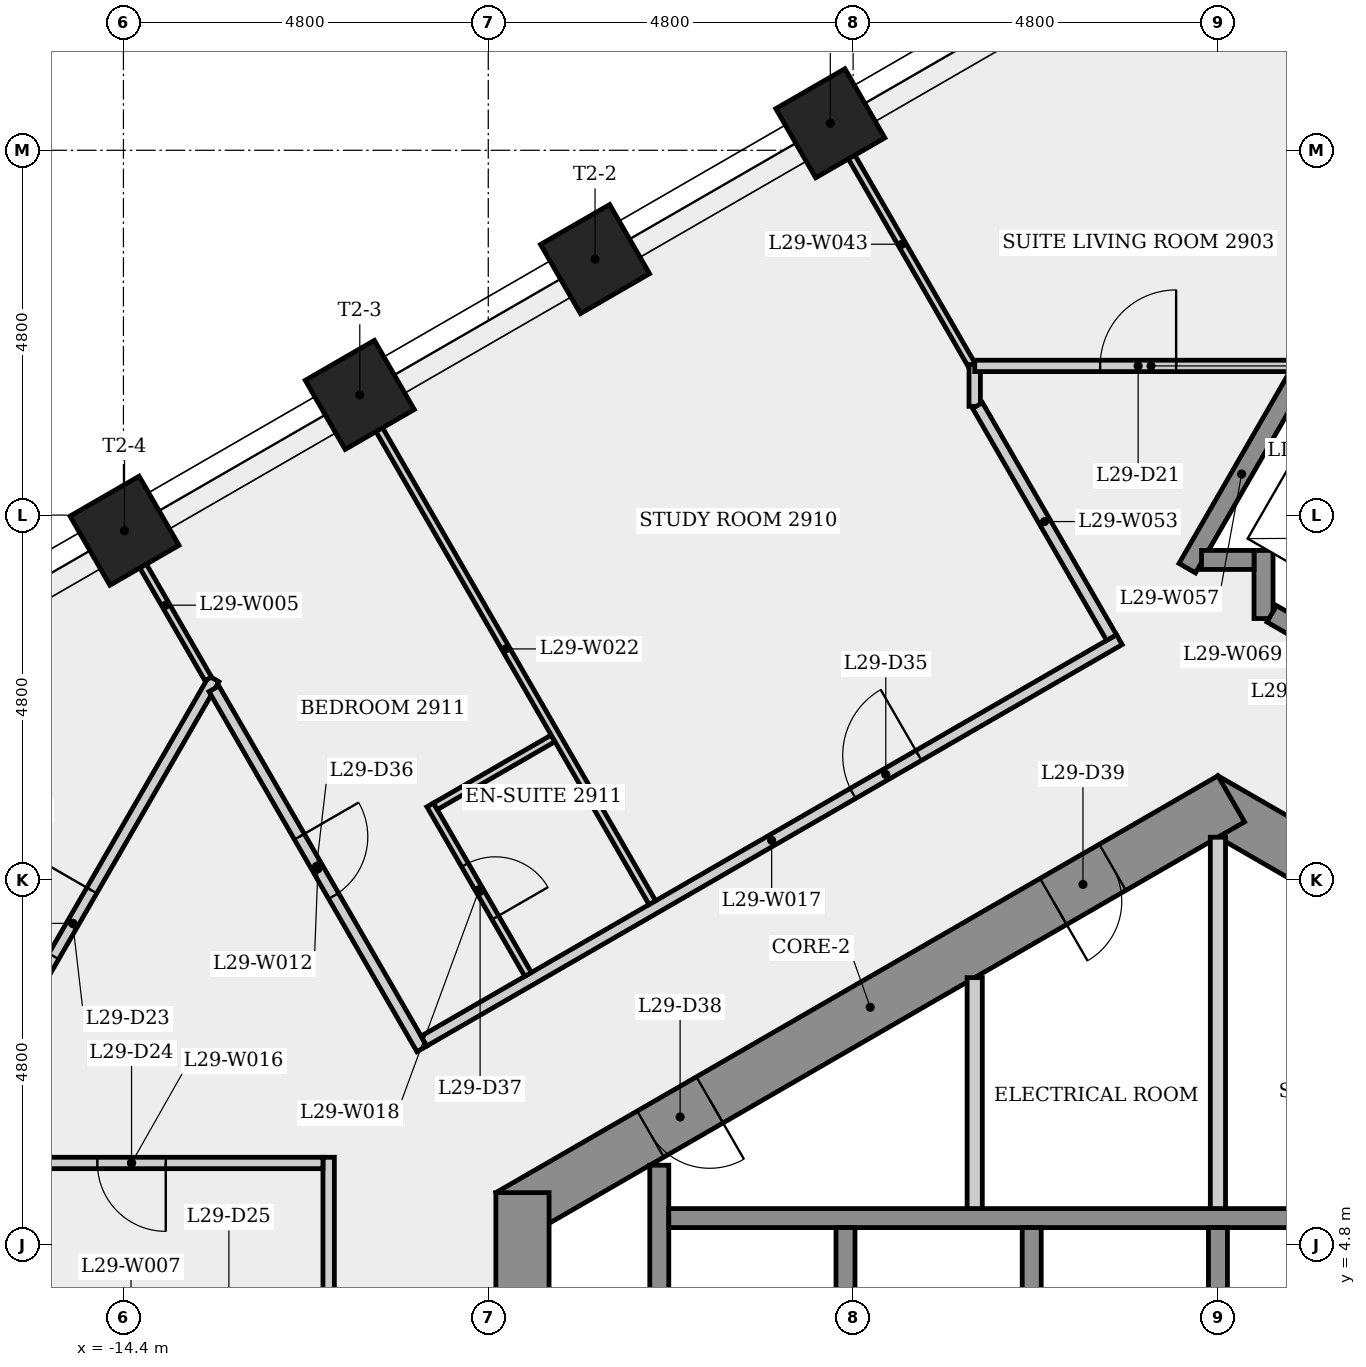
"""IFC4 building model, lengths in metres.
Left out: names, types, materials, properties, quantities, classifications, styles, units other than length and angle.
Written with IfcOpenShell. Run it as: python <this file> out.ifc"""

import sys

from ifc_helpers import new_model, si_unit, direction, frame, frame_2d, origin, origin_2d, place, context, subcontext, project, spatial, rectangle, extrude, element, fill, save


model = new_model("IFC4")
c1 = context("Model", 3, precision=1e-05, world=origin(), true_north=direction((0.0, 1.0)))
c2 = subcontext(c1, "Body", "Model", "MODEL_VIEW")
j1 = project(units=[si_unit("LENGTHUNIT", "METRE"), si_unit("PLANEANGLEUNIT", "RADIAN")], contexts=[c1])
p1 = place(None, origin())
s1 = spatial("IfcSite", under=j1, at=p1, CompositionType="ELEMENT")
p2 = place(p1, origin())
s2 = spatial("IfcBuilding", under=s1, at=p2, CompositionType="ELEMENT")
p3 = place(p2, frame((0.0, 0.0, 110.3)))
s3 = spatial("IfcBuildingStorey", under=s2, at=p3, CompositionType="ELEMENT", Elevation=110.3)
p4 = place(p3, frame((9.325, 5.182, 0.0), z_axis=(0.0, 0.0, 1.0), x_axis=(-0.866023993627, 0.500002442456, 0.0)))
e1 = element("IfcWall", 1, at=p4, inside=s3, PredefinedType="SHEAR", context=c2, shape_type="SweptSolid", body=[
    extrude(rectangle(XDim=10.97, YDim=0.7, at=frame_2d((5.485, 0.0))), origin(), (0.0, 0.0, 1.0), 3.4),
])
p5 = place(p4, frame((8.384, 0.0, 0.0)))
e2 = element("IfcOpeningElement", 2, at=p5, cuts=e1, PredefinedType="OPENING", context=c2, shape_type="SweptSolid", body=[
    extrude(rectangle(XDim=0.9, YDim=2.1, at=frame_2d((0.45, 1.05))), frame((0.0, 0.36, 0.0), z_axis=(0.0, -1.0, 0.0), x_axis=(1.0, 0.0, 0.0)), (0.0, 0.0, 1.0), 0.72),
])
p6 = place(p4, frame((1.663, 0.0, 0.0)))
e3 = element("IfcOpeningElement", 3, at=p6, cuts=e1, PredefinedType="OPENING", context=c2, shape_type="SweptSolid", body=[
    extrude(rectangle(XDim=0.9, YDim=2.1, at=frame_2d((0.45, 1.05))), frame((0.0, 0.36, 0.0), z_axis=(0.0, -1.0, 0.0), x_axis=(1.0, 0.0, 0.0)), (0.0, 0.0, 1.0), 0.72),
])
p7 = place(p3, frame((0.175, 10.667, 0.0), z_axis=(0.0, 0.0, 1.0), x_axis=(-0.866023993627, -0.500002442456, 0.0)))
e4 = element("IfcWall", 4, at=p7, inside=s3, PredefinedType="SHEAR", context=c2, shape_type="SweptSolid", body=[
    extrude(rectangle(XDim=10.97, YDim=0.7, at=frame_2d((5.485, 0.0))), origin(), (0.0, 0.0, 1.0), 3.4),
])
p8 = place(p7, frame((7.923, 0.0, 0.0)))
e5 = element("IfcOpeningElement", 5, at=p8, cuts=e4, PredefinedType="OPENING", context=c2, shape_type="SweptSolid", body=[
    extrude(rectangle(XDim=0.9, YDim=2.1, at=frame_2d((0.45, 1.05))), frame((0.0, 0.36, 0.0), z_axis=(0.0, -1.0, 0.0), x_axis=(1.0, 0.0, 0.0)), (0.0, 0.0, 1.0), 0.72),
])
p9 = place(p7, frame((1.802, 0.0, 0.0)))
e6 = element("IfcOpeningElement", 6, at=p9, cuts=e4, PredefinedType="OPENING", context=c2, shape_type="SweptSolid", body=[
    extrude(rectangle(XDim=0.9, YDim=2.1, at=frame_2d((0.45, 1.05))), frame((0.0, 0.36, 0.0), z_axis=(0.0, -1.0, 0.0), x_axis=(1.0, 0.0, 0.0)), (0.0, 0.0, 1.0), 0.72),
])
p10 = place(p3, frame((-9.15, 5.485, 0.0), z_axis=(0.0, 0.0, 1.0), x_axis=(0.0, -1.0, 0.0)))
e7 = element("IfcWall", 7, at=p10, inside=s3, PredefinedType="SHEAR", context=c2, shape_type="SweptSolid", body=[
    extrude(rectangle(XDim=10.97, YDim=0.7, at=frame_2d((5.485, 0.0))), origin(), (0.0, 0.0, 1.0), 3.4),
])
p11 = place(p10, frame((4.685, 0.0, 0.0)))
e8 = element("IfcOpeningElement", 8, at=p11, cuts=e7, PredefinedType="OPENING", context=c2, shape_type="SweptSolid", body=[
    extrude(rectangle(XDim=1.6, YDim=2.1, at=frame_2d((0.8, 1.05))), frame((0.0, 0.36, 0.0), z_axis=(0.0, -1.0, 0.0), x_axis=(1.0, 0.0, 0.0)), (0.0, 0.0, 1.0), 0.72),
])
for number, where, z_axis, x_axis in (
    (9, (-5.1, 19.556, 0.0), (0.0, 0.0, 1.0), (-0.5, 0.866, 0.0)),
    (10, (-8.195, 17.769, 0.0), (0.0, 0.0, 1.0), (-0.5, 0.866, 0.0)),
    (11, (-11.291, 15.981, 0.0), (0.0, 0.0, 1.0), (-0.5, 0.866, 0.0)),
    (12, (-14.386, 14.194, 0.0), (0.0, 0.0, 1.0), (-0.5, 0.866, 0.0)),
):
    element("IfcColumn", number, at=place(p3, frame(where, z_axis=z_axis, x_axis=x_axis)), inside=s3, PredefinedType="COLUMN", context=c2, shape_type="SweptSolid", body=[
        extrude(rectangle(XDim=1.05, YDim=1.05, at=origin_2d()), origin(), (0.0, 0.0, 1.0), 3.4),
    ])
p12 = place(p3, frame((-16.924, 5.81, 0.0), z_axis=(0.0, 0.0, 1.0), x_axis=(0.500008780733, 0.866020334166, 0.0)))
e13 = element("IfcWall", 13, at=p12, inside=s3, PredefinedType="PARTITIONING", context=c2, shape_type="SweptSolid", body=[
    extrude(rectangle(XDim=7.43, YDim=0.15, at=frame_2d((3.715, 0.0))), origin(), (0.0, 0.0, 1.0), 3.05),
])
p13 = place(p12, frame((3.215, 0.0, 0.0)))
e14 = element("IfcOpeningElement", 14, at=p13, cuts=e13, PredefinedType="OPENING", context=c2, shape_type="SweptSolid", body=[
    extrude(rectangle(XDim=1.0, YDim=2.1, at=frame_2d((0.5, 1.05))), frame((0.0, 0.085, 0.0), z_axis=(0.0, -1.0, 0.0), x_axis=(1.0, 0.0, 0.0)), (0.0, 0.0, 1.0), 0.17),
])
p14 = place(p3, frame((-14.404, 14.184, 0.0), z_axis=(0.0, 0.0, 1.0), x_axis=(0.500008734195, -0.866020361036, 0.0)))
e15 = element("IfcWall", 15, at=p14, inside=s3, PredefinedType="PARTITIONING", context=c2, shape_type="SweptSolid", body=[
    extrude(rectangle(XDim=2.239, YDim=0.1, at=frame_2d((1.12, 0.0))), origin(), (0.0, 0.0, 1.0), 3.05),
])
p15 = place(p3, frame((-13.209, 12.115, 0.0), z_axis=(0.0, 0.0, 1.0), x_axis=(0.499992837287, -0.866029539139, 0.0)))
e16 = element("IfcWall", 16, at=p15, inside=s3, PredefinedType="PARTITIONING", context=c2, shape_type="SweptSolid", body=[
    extrude(rectangle(XDim=5.471, YDim=0.15, at=frame_2d((2.736, 0.0))), origin(), (0.0, 0.0, 1.0), 3.05),
])
p16 = place(p15, frame((2.248, 0.0, 0.0)))
e17 = element("IfcOpeningElement", 17, at=p16, cuts=e16, PredefinedType="OPENING", context=c2, shape_type="SweptSolid", body=[
    extrude(rectangle(XDim=0.9, YDim=2.1, at=frame_2d((0.45, 1.05))), frame((0.0, 0.085, 0.0), z_axis=(0.0, -1.0, 0.0), x_axis=(1.0, 0.0, 0.0)), (0.0, 0.0, 1.0), 0.17),
])
p17 = place(p3, frame((-11.7, 5.95, 0.0), z_axis=(0.0, 0.0, 1.0), x_axis=(0.0, -1.0, 0.0)))
e18 = element("IfcWall", 18, at=p17, inside=s3, PredefinedType="PARTITIONING", context=c2, shape_type="SweptSolid", body=[
    extrude(rectangle(XDim=11.825, YDim=0.15, at=frame_2d((5.913, 0.0))), origin(), (0.0, 0.0, 1.0), 3.05),
])
p18 = place(p17, frame((7.424, 0.0, 0.0)))
e19 = element("IfcOpeningElement", 19, at=p18, cuts=e18, PredefinedType="OPENING", context=c2, shape_type="SweptSolid", body=[
    extrude(rectangle(XDim=1.0, YDim=2.1, at=frame_2d((0.5, 1.05))), frame((0.0, 0.085, 0.0), z_axis=(0.0, -1.0, 0.0), x_axis=(1.0, 0.0, 0.0)), (0.0, 0.0, 1.0), 0.17),
])
p19 = place(p3, frame((-11.775, 5.875, 0.0), z_axis=(0.0, 0.0, 1.0), x_axis=(-1.0, 0.0, 0.0)))
e20 = element("IfcWall", 20, at=p19, inside=s3, PredefinedType="PARTITIONING", context=c2, shape_type="SweptSolid", body=[
    extrude(rectangle(XDim=5.037, YDim=0.15, at=frame_2d((2.518, 0.0))), origin(), (0.0, 0.0, 1.0), 3.05),
])
p20 = place(p19, frame((2.068, 0.0, 0.0)))
e21 = element("IfcOpeningElement", 21, at=p20, cuts=e20, PredefinedType="OPENING", context=c2, shape_type="SweptSolid", body=[
    extrude(rectangle(XDim=0.9, YDim=2.1, at=frame_2d((0.45, 1.05))), frame((0.0, 0.085, 0.0), z_axis=(0.0, -1.0, 0.0), x_axis=(1.0, 0.0, 0.0)), (0.0, 0.0, 1.0), 0.17),
])
p21 = place(p3, frame((-10.446, 7.479, 0.0), z_axis=(0.0, 0.0, 1.0), x_axis=(0.866020092673, 0.500009199002, 0.0)))
e22 = element("IfcWall", 22, at=p21, inside=s3, PredefinedType="PARTITIONING", context=c2, shape_type="SweptSolid", body=[
    extrude(rectangle(XDim=10.564, YDim=0.15, at=frame_2d((5.282, 0.0))), origin(), (0.0, 0.0, 1.0), 3.05),
])
p22 = place(p21, frame((6.516, 0.0, 0.0)))
e23 = element("IfcOpeningElement", 23, at=p22, cuts=e22, PredefinedType="OPENING", context=c2, shape_type="SweptSolid", body=[
    extrude(rectangle(XDim=1.0, YDim=2.1, at=frame_2d((0.5, 1.05))), frame((0.0, 0.085, 0.0), z_axis=(0.0, -1.0, 0.0), x_axis=(1.0, 0.0, 0.0)), (0.0, 0.0, 1.0), 0.17),
])
p23 = place(p3, frame((-10.364, 10.586, 0.0), z_axis=(0.0, 0.0, 1.0), x_axis=(0.499963209246, -0.866046643894, 0.0)))
e24 = element("IfcWall", 24, at=p23, inside=s3, PredefinedType="PARTITIONING", context=c2, shape_type="SweptSolid", body=[
    extrude(rectangle(XDim=2.575, YDim=0.1, at=frame_2d((1.288, 0.0))), origin(), (0.0, 0.0, 1.0), 3.05),
])
p24 = place(p23, frame((0.913, 0.0, 0.0)))
e25 = element("IfcOpeningElement", 25, at=p24, cuts=e24, PredefinedType="OPENING", context=c2, shape_type="SweptSolid", body=[
    extrude(rectangle(XDim=0.8, YDim=2.1, at=frame_2d((0.4, 1.05))), frame((0.0, 0.06, 0.0), z_axis=(0.0, -1.0, 0.0), x_axis=(1.0, 0.0, 0.0)), (0.0, 0.0, 1.0), 0.12),
])
p25 = place(p3, frame((-8.747, 11.462, 0.0), z_axis=(0.0, 0.0, 1.0), x_axis=(-0.866033252409, -0.499986405537, 0.0)))
e26 = element("IfcWall", 26, at=p25, inside=s3, PredefinedType="PARTITIONING", context=c2, shape_type="SweptSolid", body=[
    extrude(rectangle(XDim=1.788, YDim=0.1, at=frame_2d((0.894, 0.0))), origin(), (0.0, 0.0, 1.0), 3.05),
])
p26 = place(p3, frame((-11.296, 15.978, 0.0), z_axis=(0.0, 0.0, 1.0), x_axis=(0.499997453958, -0.866026873738, 0.0)))
e27 = element("IfcWall", 27, at=p26, inside=s3, PredefinedType="PARTITIONING", context=c2, shape_type="SweptSolid", body=[
    extrude(rectangle(XDim=7.71, YDim=0.1, at=frame_2d((3.855, 0.0))), origin(), (0.0, 0.0, 1.0), 3.05),
])
p27 = place(p3, frame((-7.35, 1.925, 0.0), z_axis=(0.0, 0.0, 1.0), x_axis=(0.0, 1.0, 0.0)))
e28 = element("IfcWall", 28, at=p27, inside=s3, PredefinedType="SHEAR", context=c2, shape_type="SweptSolid", body=[
    extrude(rectangle(XDim=3.921, YDim=0.25, at=frame_2d((1.96, 0.0))), origin(), (0.0, 0.0, 1.0), 3.05),
])
p28 = place(p3, frame((-7.225, 5.15, 0.0), z_axis=(0.0, 0.0, 1.0), x_axis=(1.0, 0.0, 0.0)))
e29 = element("IfcWall", 29, at=p28, inside=s3, PredefinedType="SHEAR", context=c2, shape_type="SweptSolid", body=[
    extrude(rectangle(XDim=14.7, YDim=0.25, at=frame_2d((7.35, 0.0))), origin(), (0.0, 0.0, 1.0), 3.05),
])
p29 = place(p3, frame((-4.9, 5.025, 0.0), z_axis=(0.0, 0.0, 1.0), x_axis=(0.0, -1.0, 0.0)))
e30 = element("IfcWall", 30, at=p29, inside=s3, PredefinedType="SHEAR", context=c2, shape_type="SweptSolid", body=[
    extrude(rectangle(XDim=3.1, YDim=0.25, at=frame_2d((1.55, 0.0))), origin(), (0.0, 0.0, 1.0), 3.4),
])
p30 = place(p3, frame((-3.232, 16.362, 0.0), z_axis=(0.0, 0.0, 1.0), x_axis=(-0.499992827086, 0.866029545028, 0.0)))
e31 = element("IfcWall", 31, at=p30, inside=s3, PredefinedType="PARTITIONING", context=c2, shape_type="SweptSolid", body=[
    extrude(rectangle(XDim=3.7, YDim=0.1, at=frame_2d((1.85, 0.0))), origin(), (0.0, 0.0, 1.0), 3.05),
])
p31 = place(p3, frame((-3.2, 8.314, 0.0), z_axis=(0.0, 0.0, 1.0), x_axis=(0.0, -1.0, 0.0)))
e32 = element("IfcWall", 32, at=p31, inside=s3, PredefinedType="PARTITIONING", context=c2, shape_type="SweptSolid", body=[
    extrude(rectangle(XDim=3.039, YDim=0.2, at=frame_2d((1.52, 0.0))), origin(), (0.0, 0.0, 1.0), 3.05),
])
p32 = place(p3, frame((-3.2, 15.831, 0.0), z_axis=(0.0, 0.0, 1.0), x_axis=(0.0, 1.0, 0.0)))
e33 = element("IfcWall", 33, at=p32, inside=s3, PredefinedType="PARTITIONING", context=c2, shape_type="SweptSolid", body=[
    extrude(rectangle(XDim=0.55, YDim=0.15, at=frame_2d((0.275, 0.0))), origin(), (0.0, 0.0, 1.0), 3.05),
])
p33 = place(p3, frame((-3.2, 16.363, 0.0), z_axis=(0.0, 0.0, 1.0), x_axis=(1.0, 0.0, 0.0)))
e34 = element("IfcWall", 34, at=p33, inside=s3, PredefinedType="PARTITIONING", context=c2, shape_type="SweptSolid", body=[
    extrude(rectangle(XDim=4.639, YDim=0.15, at=frame_2d((2.32, 0.0))), origin(), (0.0, 0.0, 1.0), 3.05),
])
p34 = place(p33, frame((1.65, 0.0, 0.0)))
e35 = element("IfcOpeningElement", 35, at=p34, cuts=e34, PredefinedType="OPENING", context=c2, shape_type="SweptSolid", body=[
    extrude(rectangle(XDim=1.0, YDim=2.1, at=frame_2d((0.5, 1.05))), frame((0.0, 0.085, 0.0), z_axis=(0.0, -1.0, 0.0), x_axis=(1.0, 0.0, 0.0)), (0.0, 0.0, 1.0), 0.17),
])
p35 = place(p3, frame((-2.45, 5.025, 0.0), z_axis=(0.0, 0.0, 1.0), x_axis=(0.0, -1.0, 0.0)))
e36 = element("IfcWall", 36, at=p35, inside=s3, PredefinedType="SHEAR", context=c2, shape_type="SweptSolid", body=[
    extrude(rectangle(XDim=3.1, YDim=0.25, at=frame_2d((1.55, 0.0))), origin(), (0.0, 0.0, 1.0), 3.4),
])
p36 = place(p3, frame((-1.4, 12.788, 0.0), z_axis=(0.0, 0.0, 1.0), x_axis=(-0.500012199891, 0.86601836006, 0.0)))
e37 = element("IfcWall", 37, at=p36, inside=s3, PredefinedType="PARTITIONING", context=c2, shape_type="SweptSolid", body=[
    extrude(rectangle(XDim=3.525, YDim=0.15, at=frame_2d((1.763, 0.0))), origin(), (0.0, 0.0, 1.0), 3.05),
])
p37 = place(p3, frame((-0.403, 13.702, 0.0), z_axis=(0.0, 0.0, 1.0), x_axis=(0.499976111731, 0.866039195244, 0.0)))
e38 = element("IfcWall", 38, at=p37, inside=s3, PredefinedType="SHEAR", context=c2, shape_type="SweptSolid", body=[
    extrude(rectangle(XDim=2.861, YDim=0.25, at=frame_2d((1.43, 0.0))), origin(), (0.0, 0.0, 1.0), 3.05),
])
p38 = place(p3, frame((0.0, 5.025, 0.0), z_axis=(0.0, 0.0, 1.0), x_axis=(0.0, -1.0, 0.0)))
e39 = element("IfcWall", 39, at=p38, inside=s3, PredefinedType="SHEAR", context=c2, shape_type="SweptSolid", body=[
    extrude(rectangle(XDim=3.1, YDim=0.25, at=frame_2d((1.55, 0.0))), origin(), (0.0, 0.0, 1.0), 3.4),
])
p39 = place(p3, frame((0.0, 10.161, 0.0), z_axis=(0.0, 0.0, 1.0), x_axis=(0.0, -1.0, 0.0)))
e40 = element("IfcWall", 40, at=p39, inside=s3, PredefinedType="PARTITIONING", context=c2, shape_type="SweptSolid", body=[
    extrude(rectangle(XDim=4.886, YDim=0.2, at=frame_2d((2.443, 0.0))), origin(), (0.0, 0.0, 1.0), 3.05),
])
p40 = place(p3, frame((0.6, 13.039, 0.0), z_axis=(0.0, 0.0, 1.0), x_axis=(0.0, 1.0, 0.0)))
e41 = element("IfcWall", 41, at=p40, inside=s3, PredefinedType="SHEAR", context=c2, shape_type="SweptSolid", body=[
    extrude(rectangle(XDim=0.896, YDim=0.25, at=frame_2d((0.448, 0.0))), origin(), (0.0, 0.0, 1.0), 3.05),
])
p41 = place(p3, frame((0.475, 13.81, 0.0), z_axis=(0.0, 0.0, 1.0), x_axis=(-1.0, 0.0, 0.0)))
e42 = element("IfcWall", 42, at=p41, inside=s3, PredefinedType="SHEAR", context=c2, shape_type="SweptSolid", body=[
    extrude(rectangle(XDim=0.691, YDim=0.25, at=frame_2d((0.345, 0.0))), origin(), (0.0, 0.0, 1.0), 3.4),
])
p42 = place(p3, frame((2.581, 12.02, 0.0), z_axis=(0.0, 0.0, 1.0), x_axis=(-0.86603892542, 0.499976579108, 0.0)))
e43 = element("IfcWall", 43, at=p42, inside=s3, PredefinedType="SHEAR", context=c2, shape_type="SweptSolid", body=[
    extrude(rectangle(XDim=2.162, YDim=0.25, at=frame_2d((1.081, 0.0))), origin(), (0.0, 0.0, 1.0), 3.05),
])
p43 = place(p34, origin())
e44 = element("IfcDoor", 44, at=p43, inside=s3, OperationType="SINGLE_SWING_RIGHT", PredefinedType="DOOR", context=c2, shape_type="SweptSolid", body=[
    extrude(rectangle(XDim=1.0, YDim=2.1, at=frame_2d((0.5, 1.05))), frame((0.0, 0.025, 0.0), z_axis=(0.0, -1.0, 0.0), x_axis=(1.0, 0.0, 0.0)), (0.0, 0.0, 1.0), 0.05),
])
fill(e35, e44)
p44 = place(p13, origin())
e45 = element("IfcDoor", 45, at=p44, inside=s3, OperationType="SINGLE_SWING_RIGHT", PredefinedType="DOOR", context=c2, shape_type="SweptSolid", body=[
    extrude(rectangle(XDim=1.0, YDim=2.1, at=frame_2d((0.5, 1.05))), frame((0.0, 0.025, 0.0), z_axis=(0.0, -1.0, 0.0), x_axis=(1.0, 0.0, 0.0)), (0.0, 0.0, 1.0), 0.05),
])
fill(e14, e45)
p45 = place(p20, origin())
e46 = element("IfcDoor", 46, at=p45, inside=s3, OperationType="SINGLE_SWING_LEFT", PredefinedType="DOOR", context=c2, shape_type="SweptSolid", body=[
    extrude(rectangle(XDim=0.9, YDim=2.1, at=frame_2d((0.45, 1.05))), frame((0.0, 0.025, 0.0), z_axis=(0.0, -1.0, 0.0), x_axis=(1.0, 0.0, 0.0)), (0.0, 0.0, 1.0), 0.05),
])
fill(e21, e46)
p46 = place(p22, origin())
e47 = element("IfcDoor", 47, at=p46, inside=s3, OperationType="SINGLE_SWING_RIGHT", PredefinedType="DOOR", context=c2, shape_type="SweptSolid", body=[
    extrude(rectangle(XDim=1.0, YDim=2.1, at=frame_2d((0.5, 1.05))), frame((0.0, 0.025, 0.0), z_axis=(0.0, -1.0, 0.0), x_axis=(1.0, 0.0, 0.0)), (0.0, 0.0, 1.0), 0.05),
])
fill(e23, e47)
p47 = place(p16, origin())
e48 = element("IfcDoor", 48, at=p47, inside=s3, OperationType="SINGLE_SWING_LEFT", PredefinedType="DOOR", context=c2, shape_type="SweptSolid", body=[
    extrude(rectangle(XDim=0.9, YDim=2.1, at=frame_2d((0.45, 1.05))), frame((0.0, 0.025, 0.0), z_axis=(0.0, -1.0, 0.0), x_axis=(1.0, 0.0, 0.0)), (0.0, 0.0, 1.0), 0.05),
])
fill(e17, e48)
p48 = place(p24, origin())
e49 = element("IfcDoor", 49, at=p48, inside=s3, OperationType="SINGLE_SWING_RIGHT", PredefinedType="DOOR", context=c2, shape_type="SweptSolid", body=[
    extrude(rectangle(XDim=0.8, YDim=2.1, at=frame_2d((0.4, 1.05))), frame((0.0, 0.025, 0.0), z_axis=(0.0, -1.0, 0.0), x_axis=(1.0, 0.0, 0.0)), (0.0, 0.0, 1.0), 0.05),
])
fill(e25, e49)
p49 = place(p8, origin())
e50 = element("IfcDoor", 50, at=p49, inside=s3, OperationType="SINGLE_SWING_LEFT", PredefinedType="DOOR", context=c2, shape_type="SweptSolid", body=[
    extrude(rectangle(XDim=0.9, YDim=2.1, at=frame_2d((0.45, 1.05))), frame((0.0, 0.025, 0.0), z_axis=(0.0, -1.0, 0.0), x_axis=(1.0, 0.0, 0.0)), (0.0, 0.0, 1.0), 0.05),
])
fill(e5, e50)
p50 = place(p9, origin())
e51 = element("IfcDoor", 51, at=p50, inside=s3, OperationType="SINGLE_SWING_RIGHT", PredefinedType="DOOR", context=c2, shape_type="SweptSolid", body=[
    extrude(rectangle(XDim=0.9, YDim=2.1, at=frame_2d((0.45, 1.05))), frame((0.0, 0.025, 0.0), z_axis=(0.0, -1.0, 0.0), x_axis=(1.0, 0.0, 0.0)), (0.0, 0.0, 1.0), 0.05),
])
fill(e6, e51)
save(model, sys.argv[1])
